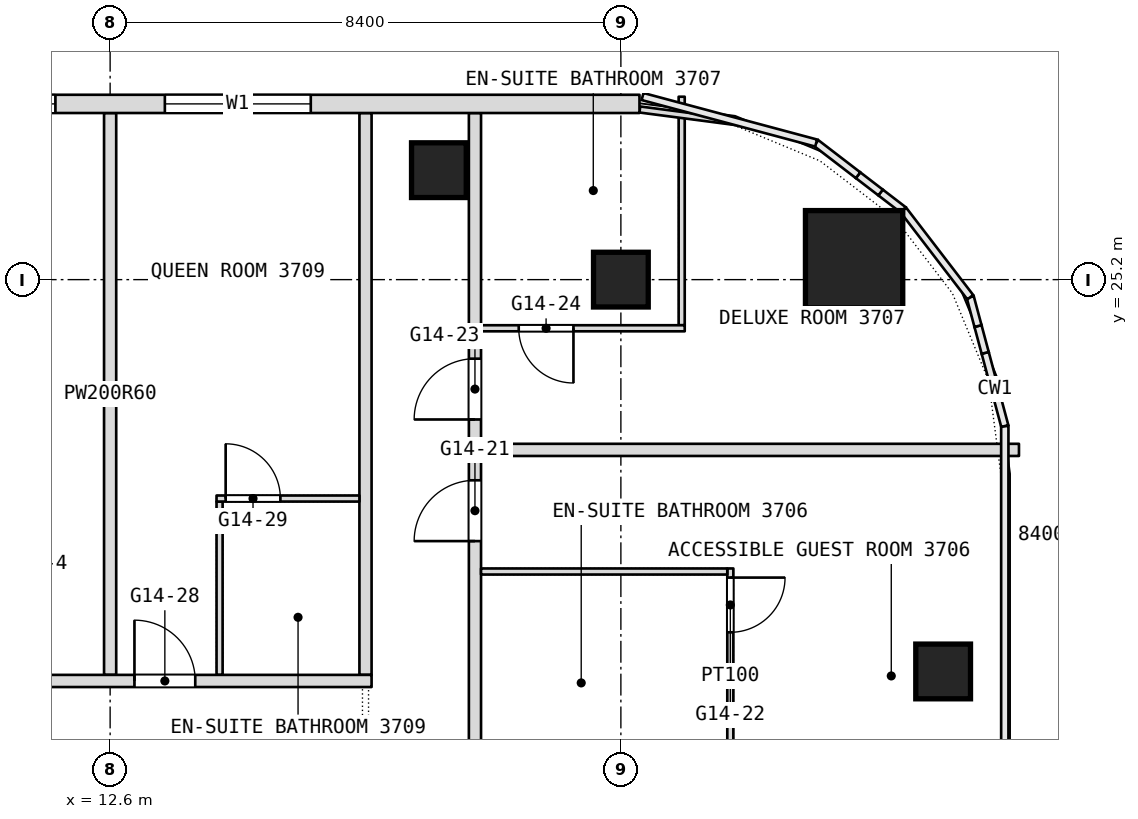
"""IFC4 building model, lengths in metres.
Left out: names, types, materials, properties, quantities, classifications, styles, units other than length and angle.
Written with IfcOpenShell. Run it as: python <this file> out.ifc"""

import sys

from ifc_helpers import new_model, si_unit, direction, frame, frame_2d, origin, origin_2d, place, context, subcontext, project, spatial, rectangle, extrude, element, fill, save


model = new_model("IFC4")
c1 = context("Model", 3, precision=1e-05, world=origin(), true_north=direction((0.0, 1.0)))
c2 = subcontext(c1, "Body", "Model", "MODEL_VIEW")
j1 = project(units=[si_unit("LENGTHUNIT", "METRE"), si_unit("PLANEANGLEUNIT", "RADIAN")], contexts=[c1])
p1 = place(None, origin())
s1 = spatial("IfcSite", under=j1, at=p1, CompositionType="ELEMENT")
p2 = place(p1, origin())
s2 = spatial("IfcBuilding", under=s1, at=p2, CompositionType="ELEMENT")
p3 = place(p2, frame((0.0, 0.0, 158.9)))
s3 = spatial("IfcBuildingStorey", under=s2, at=p3, CompositionType="ELEMENT", Elevation=158.9)
p4 = place(p3, frame((24.835, 25.535, 0.0), z_axis=(0.0, 0.0, 1.0), x_axis=(1.0, 0.0, 0.0)))
e1 = element("IfcColumn", 1, at=p4, inside=s3, PredefinedType="COLUMN", context=c2, shape_type="SweptSolid", body=[
    extrude(rectangle(XDim=1.6, YDim=1.6, at=origin_2d()), origin(), (0.0, 0.0, 1.0), 3.6),
])
for number, where, z_axis, x_axis in (
    (2, (21.0, 25.2, 0.0), (0.0, 0.0, 1.0), (1.0, 0.0, 0.0)),
    (3, (18.007, 27.0, 0.0), (0.0, 0.0, 1.0), (1.0, 0.0, 0.0)),
    (4, (26.3, 18.756, 0.0), (0.0, 0.0, 1.0), (1.0, 0.0, 0.0)),
):
    element("IfcColumn", number, at=place(p3, frame(where, z_axis=z_axis, x_axis=x_axis)), inside=s3, PredefinedType="COLUMN", context=c2, shape_type="SweptSolid", body=[
        extrude(rectangle(XDim=0.9, YDim=0.9, at=origin_2d()), origin(), (0.0, 0.0, 1.0), 3.6),
    ])
p5 = place(p3, frame((22.8, 16.9, 0.0), z_axis=(0.0, 0.0, 1.0), x_axis=(0.0, 1.0, 0.0)))
e5 = element("IfcWall", 5, at=p5, inside=s3, PredefinedType="PARTITIONING", context=c2, shape_type="SweptSolid", body=[
    extrude(rectangle(XDim=3.55, YDim=0.1, at=frame_2d((1.775, 0.0))), origin(), (0.0, 0.0, 1.0), 3.34),
])
p6 = place(p5, frame((2.5, 0.0, 0.0)))
e6 = element("IfcOpeningElement", 6, at=p6, cuts=e5, PredefinedType="OPENING", context=c2, shape_type="SweptSolid", body=[
    extrude(rectangle(XDim=0.9, YDim=2.1, at=frame_2d((0.45, 1.05))), frame((0.0, 0.05, 0.0), z_axis=(0.0, -1.0, 0.0), x_axis=(1.0, 0.0, 0.0)), (0.0, 0.0, 1.0), 0.1),
])
p7 = place(p3, frame((22.0, 24.45, 0.0), z_axis=(0.0, 0.0, 1.0), x_axis=(0.0, 1.0, 0.0)))
e7 = element("IfcWall", 7, at=p7, inside=s3, PredefinedType="PARTITIONING", context=c2, shape_type="SweptSolid", body=[
    extrude(rectangle(XDim=3.758, YDim=0.1, at=frame_2d((1.879, 0.0))), origin(), (0.0, 0.0, 1.0), 3.34),
])
p8 = place(p3, frame((18.6, -21.708, 0.0), z_axis=(0.0, 0.0, 1.0), x_axis=(0.0, 1.0, 0.0)))
e8 = element("IfcWall", 8, at=p8, inside=s3, PredefinedType="PARTITIONING", context=c2, shape_type="SweptSolid", body=[
    extrude(rectangle(XDim=49.648, YDim=0.2, at=frame_2d((24.824, 0.0))), origin(), (0.0, 0.0, 1.0), 3.34),
])
p9 = place(p8, frame((2.204, 0.0, 0.0)))
e9 = element("IfcOpeningElement", 9, at=p9, cuts=e8, PredefinedType="OPENING", context=c2, shape_type="SweptSolid", body=[
    extrude(rectangle(XDim=0.9, YDim=2.1, at=frame_2d((0.45, 1.05))), frame((0.0, 0.1, 0.0), z_axis=(0.0, -1.0, 0.0), x_axis=(1.0, 0.0, 0.0)), (0.0, 0.0, 1.0), 0.2),
])
p10 = place(p8, frame((8.608, 0.0, 0.0)))
e10 = element("IfcOpeningElement", 10, at=p10, cuts=e8, PredefinedType="OPENING", context=c2, shape_type="SweptSolid", body=[
    extrude(rectangle(XDim=1.1, YDim=2.1, at=frame_2d((0.55, 1.05))), frame((0.0, 0.1, 0.0), z_axis=(0.0, -1.0, 0.0), x_axis=(1.0, 0.0, 0.0)), (0.0, 0.0, 1.0), 0.2),
])
p11 = place(p8, frame((16.608, 0.0, 0.0)))
e11 = element("IfcOpeningElement", 11, at=p11, cuts=e8, PredefinedType="OPENING", context=c2, shape_type="SweptSolid", body=[
    extrude(rectangle(XDim=1.8, YDim=2.1, at=frame_2d((0.9, 1.05))), frame((0.0, 0.1, 0.0), z_axis=(0.0, -1.0, 0.0), x_axis=(1.0, 0.0, 0.0)), (0.0, 0.0, 1.0), 0.2),
])
p12 = place(p8, frame((27.458, 0.0, 0.0)))
e12 = element("IfcOpeningElement", 12, at=p12, cuts=e8, PredefinedType="OPENING", context=c2, shape_type="SweptSolid", body=[
    extrude(rectangle(XDim=1.1, YDim=2.1, at=frame_2d((0.55, 1.05))), frame((0.0, 0.1, 0.0), z_axis=(0.0, -1.0, 0.0), x_axis=(1.0, 0.0, 0.0)), (0.0, 0.0, 1.0), 0.2),
])
p13 = place(p8, frame((30.508, 0.0, 0.0)))
e13 = element("IfcOpeningElement", 13, at=p13, cuts=e8, PredefinedType="OPENING", context=c2, shape_type="SweptSolid", body=[
    extrude(rectangle(XDim=1.0, YDim=2.1, at=frame_2d((0.5, 1.05))), frame((0.0, 0.1, 0.0), z_axis=(0.0, -1.0, 0.0), x_axis=(1.0, 0.0, 0.0)), (0.0, 0.0, 1.0), 0.2),
])
p14 = place(p8, frame((37.108, 0.0, 0.0)))
e14 = element("IfcOpeningElement", 14, at=p14, cuts=e8, PredefinedType="OPENING", context=c2, shape_type="SweptSolid", body=[
    extrude(rectangle(XDim=1.0, YDim=2.1, at=frame_2d((0.5, 1.05))), frame((0.0, 0.1, 0.0), z_axis=(0.0, -1.0, 0.0), x_axis=(1.0, 0.0, 0.0)), (0.0, 0.0, 1.0), 0.2),
])
p15 = place(p8, frame((42.608, 0.0, 0.0)))
e15 = element("IfcOpeningElement", 15, at=p15, cuts=e8, PredefinedType="OPENING", context=c2, shape_type="SweptSolid", body=[
    extrude(rectangle(XDim=1.0, YDim=2.1, at=frame_2d((0.5, 1.05))), frame((0.0, 0.1, 0.0), z_axis=(0.0, -1.0, 0.0), x_axis=(1.0, 0.0, 0.0)), (0.0, 0.0, 1.0), 0.2),
])
p16 = place(p8, frame((44.608, 0.0, 0.0)))
e16 = element("IfcOpeningElement", 16, at=p16, cuts=e8, PredefinedType="OPENING", context=c2, shape_type="SweptSolid", body=[
    extrude(rectangle(XDim=1.0, YDim=2.1, at=frame_2d((0.5, 1.05))), frame((0.0, 0.1, 0.0), z_axis=(0.0, -1.0, 0.0), x_axis=(1.0, 0.0, 0.0)), (0.0, 0.0, 1.0), 0.2),
])
p17 = place(p3, frame((16.8, 18.7, 0.0), z_axis=(0.0, 0.0, 1.0), x_axis=(0.0, 1.0, 0.0)))
e17 = element("IfcWall", 17, at=p17, inside=s3, PredefinedType="PARTITIONING", context=c2, shape_type="SweptSolid", body=[
    extrude(rectangle(XDim=9.24, YDim=0.2, at=frame_2d((4.62, 0.0))), origin(), (0.0, 0.0, 1.0), 3.34),
])
p18 = place(p3, frame((14.4, 18.7, 0.0), z_axis=(0.0, 0.0, 1.0), x_axis=(0.0, 1.0, 0.0)))
e18 = element("IfcWall", 18, at=p18, inside=s3, PredefinedType="PARTITIONING", context=c2, shape_type="SweptSolid", body=[
    extrude(rectangle(XDim=2.85, YDim=0.1, at=frame_2d((1.425, 0.0))), origin(), (0.0, 0.0, 1.0), 3.34),
])
p19 = place(p3, frame((12.6, 18.7, 0.0), z_axis=(0.0, 0.0, 1.0), x_axis=(0.0, 1.0, 0.0)))
e19 = element("IfcWall", 19, at=p19, inside=s3, PredefinedType="PARTITIONING", context=c2, shape_type="SweptSolid", body=[
    extrude(rectangle(XDim=9.24, YDim=0.2, at=frame_2d((4.62, 0.0))), origin(), (0.0, 0.0, 1.0), 3.34),
])
p20 = place(p3, frame((10.7, 18.6, 0.0), z_axis=(0.0, 0.0, 1.0), x_axis=(1.0, 0.0, 0.0)))
e20 = element("IfcWall", 20, at=p20, inside=s3, PredefinedType="PARTITIONING", context=c2, shape_type="SweptSolid", body=[
    extrude(rectangle(XDim=6.2, YDim=0.2, at=frame_2d((3.1, 0.0))), origin(), (0.0, 0.0, 1.0), 3.34),
])
p21 = place(p20, frame((2.3, 0.0, 0.0)))
e21 = element("IfcOpeningElement", 21, at=p21, cuts=e20, PredefinedType="OPENING", context=c2, shape_type="SweptSolid", body=[
    extrude(rectangle(XDim=1.0, YDim=2.1, at=frame_2d((0.5, 1.05))), frame((0.0, 0.1, 0.0), z_axis=(0.0, -1.0, 0.0), x_axis=(1.0, 0.0, 0.0)), (0.0, 0.0, 1.0), 0.2),
])
p22 = place(p3, frame((18.7, 20.4, 0.0), z_axis=(0.0, 0.0, 1.0), x_axis=(1.0, 0.0, 0.0)))
e22 = element("IfcWall", 22, at=p22, inside=s3, PredefinedType="PARTITIONING", context=c2, shape_type="SweptSolid", body=[
    extrude(rectangle(XDim=4.05, YDim=0.1, at=frame_2d((2.025, 0.0))), origin(), (0.0, 0.0, 1.0), 3.34),
])
p23 = place(p3, frame((14.35, 21.6, 0.0), z_axis=(0.0, 0.0, 1.0), x_axis=(1.0, 0.0, 0.0)))
e23 = element("IfcWall", 23, at=p23, inside=s3, PredefinedType="PARTITIONING", context=c2, shape_type="SweptSolid", body=[
    extrude(rectangle(XDim=2.35, YDim=0.1, at=frame_2d((1.175, 0.0))), origin(), (0.0, 0.0, 1.0), 3.34),
])
p24 = place(p23, frame((0.15, 0.0, 0.0)))
e24 = element("IfcOpeningElement", 24, at=p24, cuts=e23, PredefinedType="OPENING", context=c2, shape_type="SweptSolid", body=[
    extrude(rectangle(XDim=0.9, YDim=2.1, at=frame_2d((0.45, 1.05))), frame((0.0, 0.05, 0.0), z_axis=(0.0, -1.0, 0.0), x_axis=(1.0, 0.0, 0.0)), (0.0, 0.0, 1.0), 0.1),
])
p25 = place(p3, frame((18.7, 22.4, 0.0), z_axis=(0.0, 0.0, 1.0), x_axis=(1.0, 0.0, 0.0)))
e25 = element("IfcWall", 25, at=p25, inside=s3, PredefinedType="PARTITIONING", context=c2, shape_type="SweptSolid", body=[
    extrude(rectangle(XDim=8.847, YDim=0.2, at=frame_2d((4.424, 0.0))), origin(), (0.0, 0.0, 1.0), 3.34),
])
p26 = place(p3, frame((18.7, 24.4, 0.0), z_axis=(0.0, 0.0, 1.0), x_axis=(1.0, 0.0, 0.0)))
e26 = element("IfcWall", 26, at=p26, inside=s3, PredefinedType="PARTITIONING", context=c2, shape_type="SweptSolid", body=[
    extrude(rectangle(XDim=3.35, YDim=0.1, at=frame_2d((1.675, 0.0))), origin(), (0.0, 0.0, 1.0), 3.34),
])
p27 = place(p26, frame((0.62, 0.0, 0.0)))
e27 = element("IfcOpeningElement", 27, at=p27, cuts=e26, PredefinedType="OPENING", context=c2, shape_type="SweptSolid", body=[
    extrude(rectangle(XDim=0.9, YDim=2.1, at=frame_2d((0.45, 1.05))), frame((0.0, 0.05, 0.0), z_axis=(0.0, -1.0, 0.0), x_axis=(1.0, 0.0, 0.0)), (0.0, 0.0, 1.0), 0.1),
])
p28 = place(p3, frame((21.312, 27.998, 0.0), z_axis=(0.0, 0.0, 1.0), x_axis=(0.991547575144, -0.129743617284, 0.0)))
e28 = element("IfcWall", 28, at=p28, inside=s3, PredefinedType="PARTITIONING", context=c2, shape_type="SweptSolid", body=[
    extrude(rectangle(XDim=1.626, YDim=0.1, at=frame_2d((0.813, 0.0))), origin(), (0.0, 0.0, 1.0), 3.34),
])
p29 = place(p3, frame((21.306, 28.09, 0.0), z_axis=(0.0, 0.0, 1.0), x_axis=(-1.0, 0.0, 0.0)))
e29 = element("IfcWall", 29, at=p29, inside=s3, PredefinedType="NOTDEFINED", context=c2, shape_type="SweptSolid", body=[
    extrude(rectangle(XDim=42.612, YDim=0.3, at=frame_2d((21.306, 0.0))), origin(), (0.0, 0.0, 1.0), 3.6),
])
p30 = place(p29, frame((5.406, 0.0, 0.9)))
e30 = element("IfcOpeningElement", 30, at=p30, cuts=e29, PredefinedType="OPENING", context=c2, shape_type="SweptSolid", body=[
    extrude(rectangle(XDim=2.4, YDim=2.1, at=frame_2d((1.2, 1.05))), frame((0.0, 0.15, 0.0), z_axis=(0.0, -1.0, 0.0), x_axis=(1.0, 0.0, 0.0)), (0.0, 0.0, 1.0), 0.3),
])
p31 = place(p29, frame((9.606, 0.0, 0.9)))
e31 = element("IfcOpeningElement", 31, at=p31, cuts=e29, PredefinedType="OPENING", context=c2, shape_type="SweptSolid", body=[
    extrude(rectangle(XDim=2.4, YDim=2.1, at=frame_2d((1.2, 1.05))), frame((0.0, 0.15, 0.0), z_axis=(0.0, -1.0, 0.0), x_axis=(1.0, 0.0, 0.0)), (0.0, 0.0, 1.0), 0.3),
])
p32 = place(p29, frame((13.806, 0.0, 0.9)))
e32 = element("IfcOpeningElement", 32, at=p32, cuts=e29, PredefinedType="OPENING", context=c2, shape_type="SweptSolid", body=[
    extrude(rectangle(XDim=2.4, YDim=2.1, at=frame_2d((1.2, 1.05))), frame((0.0, 0.15, 0.0), z_axis=(0.0, -1.0, 0.0), x_axis=(1.0, 0.0, 0.0)), (0.0, 0.0, 1.0), 0.3),
])
p33 = place(p29, frame((18.006, 0.0, 0.9)))
e33 = element("IfcOpeningElement", 33, at=p33, cuts=e29, PredefinedType="OPENING", context=c2, shape_type="SweptSolid", body=[
    extrude(rectangle(XDim=2.4, YDim=2.1, at=frame_2d((1.2, 1.05))), frame((0.0, 0.15, 0.0), z_axis=(0.0, -1.0, 0.0), x_axis=(1.0, 0.0, 0.0)), (0.0, 0.0, 1.0), 0.3),
])
p34 = place(p29, frame((22.206, 0.0, 0.9)))
e34 = element("IfcOpeningElement", 34, at=p34, cuts=e29, PredefinedType="OPENING", context=c2, shape_type="SweptSolid", body=[
    extrude(rectangle(XDim=2.4, YDim=2.1, at=frame_2d((1.2, 1.05))), frame((0.0, 0.15, 0.0), z_axis=(0.0, -1.0, 0.0), x_axis=(1.0, 0.0, 0.0)), (0.0, 0.0, 1.0), 0.3),
])
p35 = place(p29, frame((26.406, 0.0, 0.9)))
e35 = element("IfcOpeningElement", 35, at=p35, cuts=e29, PredefinedType="OPENING", context=c2, shape_type="SweptSolid", body=[
    extrude(rectangle(XDim=2.4, YDim=2.1, at=frame_2d((1.2, 1.05))), frame((0.0, 0.15, 0.0), z_axis=(0.0, -1.0, 0.0), x_axis=(1.0, 0.0, 0.0)), (0.0, 0.0, 1.0), 0.3),
])
p36 = place(p29, frame((30.606, 0.0, 0.9)))
e36 = element("IfcOpeningElement", 36, at=p36, cuts=e29, PredefinedType="OPENING", context=c2, shape_type="SweptSolid", body=[
    extrude(rectangle(XDim=2.4, YDim=2.1, at=frame_2d((1.2, 1.05))), frame((0.0, 0.15, 0.0), z_axis=(0.0, -1.0, 0.0), x_axis=(1.0, 0.0, 0.0)), (0.0, 0.0, 1.0), 0.3),
])
p37 = place(p29, frame((34.806, 0.0, 0.9)))
e37 = element("IfcOpeningElement", 37, at=p37, cuts=e29, PredefinedType="OPENING", context=c2, shape_type="SweptSolid", body=[
    extrude(rectangle(XDim=2.4, YDim=2.1, at=frame_2d((1.2, 1.05))), frame((0.0, 0.15, 0.0), z_axis=(0.0, -1.0, 0.0), x_axis=(1.0, 0.0, 0.0)), (0.0, 0.0, 1.0), 0.3),
])
p38 = place(p6, origin())
e38 = element("IfcDoor", 38, at=p38, inside=s3, OperationType="SINGLE_SWING_RIGHT", PredefinedType="DOOR", context=c2, shape_type="SweptSolid", body=[
    extrude(rectangle(XDim=0.9, YDim=2.1, at=frame_2d((0.45, 1.05))), frame((0.0, 0.025, 0.0), z_axis=(0.0, -1.0, 0.0), x_axis=(1.0, 0.0, 0.0)), (0.0, 0.0, 1.0), 0.05),
])
fill(e6, e38)
p39 = place(p15, origin())
e39 = element("IfcDoor", 39, at=p39, inside=s3, OperationType="SINGLE_SWING_LEFT", PredefinedType="DOOR", context=c2, shape_type="SweptSolid", body=[
    extrude(rectangle(XDim=1.0, YDim=2.1, at=frame_2d((0.5, 1.05))), frame((0.0, 0.025, 0.0), z_axis=(0.0, -1.0, 0.0), x_axis=(1.0, 0.0, 0.0)), (0.0, 0.0, 1.0), 0.05),
])
fill(e15, e39)
p40 = place(p16, origin())
e40 = element("IfcDoor", 40, at=p40, inside=s3, OperationType="SINGLE_SWING_LEFT", PredefinedType="DOOR", context=c2, shape_type="SweptSolid", body=[
    extrude(rectangle(XDim=1.0, YDim=2.1, at=frame_2d((0.5, 1.05))), frame((0.0, 0.025, 0.0), z_axis=(0.0, -1.0, 0.0), x_axis=(1.0, 0.0, 0.0)), (0.0, 0.0, 1.0), 0.05),
])
fill(e16, e40)
p41 = place(p21, origin())
e41 = element("IfcDoor", 41, at=p41, inside=s3, OperationType="SINGLE_SWING_LEFT", PredefinedType="DOOR", context=c2, shape_type="SweptSolid", body=[
    extrude(rectangle(XDim=1.0, YDim=2.1, at=frame_2d((0.5, 1.05))), frame((0.0, 0.025, 0.0), z_axis=(0.0, -1.0, 0.0), x_axis=(1.0, 0.0, 0.0)), (0.0, 0.0, 1.0), 0.05),
])
fill(e21, e41)
p42 = place(p24, origin())
e42 = element("IfcDoor", 42, at=p42, inside=s3, OperationType="SINGLE_SWING_RIGHT", PredefinedType="DOOR", context=c2, shape_type="SweptSolid", body=[
    extrude(rectangle(XDim=0.9, YDim=2.1, at=frame_2d((0.45, 1.05))), frame((0.0, 0.025, 0.0), z_axis=(0.0, -1.0, 0.0), x_axis=(1.0, 0.0, 0.0)), (0.0, 0.0, 1.0), 0.05),
])
fill(e24, e42)
p43 = place(p27, origin())
e43 = element("IfcDoor", 43, at=p43, inside=s3, OperationType="SINGLE_SWING_RIGHT", PredefinedType="DOOR", context=c2, shape_type="SweptSolid", body=[
    extrude(rectangle(XDim=0.9, YDim=2.1, at=frame_2d((0.45, 1.05))), frame((0.0, 0.025, 0.0), z_axis=(0.0, -1.0, 0.0), x_axis=(1.0, 0.0, 0.0)), (0.0, 0.0, 1.0), 0.05),
])
fill(e27, e43)
p44 = place(p30, origin())
e44 = element("IfcWindow", 44, at=p44, inside=s3, PartitioningType="SINGLE_PANEL", PredefinedType="WINDOW", context=c2, shape_type="SweptSolid", body=[
    extrude(rectangle(XDim=2.4, YDim=2.1, at=frame_2d((1.2, 1.05))), frame((0.0, 0.03, 0.0), z_axis=(0.0, -1.0, 0.0), x_axis=(1.0, 0.0, 0.0)), (0.0, 0.0, 1.0), 0.06),
])
fill(e30, e44)
p45 = place(p31, origin())
e45 = element("IfcWindow", 45, at=p45, inside=s3, PartitioningType="SINGLE_PANEL", PredefinedType="WINDOW", context=c2, shape_type="SweptSolid", body=[
    extrude(rectangle(XDim=2.4, YDim=2.1, at=frame_2d((1.2, 1.05))), frame((0.0, 0.03, 0.0), z_axis=(0.0, -1.0, 0.0), x_axis=(1.0, 0.0, 0.0)), (0.0, 0.0, 1.0), 0.06),
])
fill(e31, e45)
save(model, sys.argv[1])
